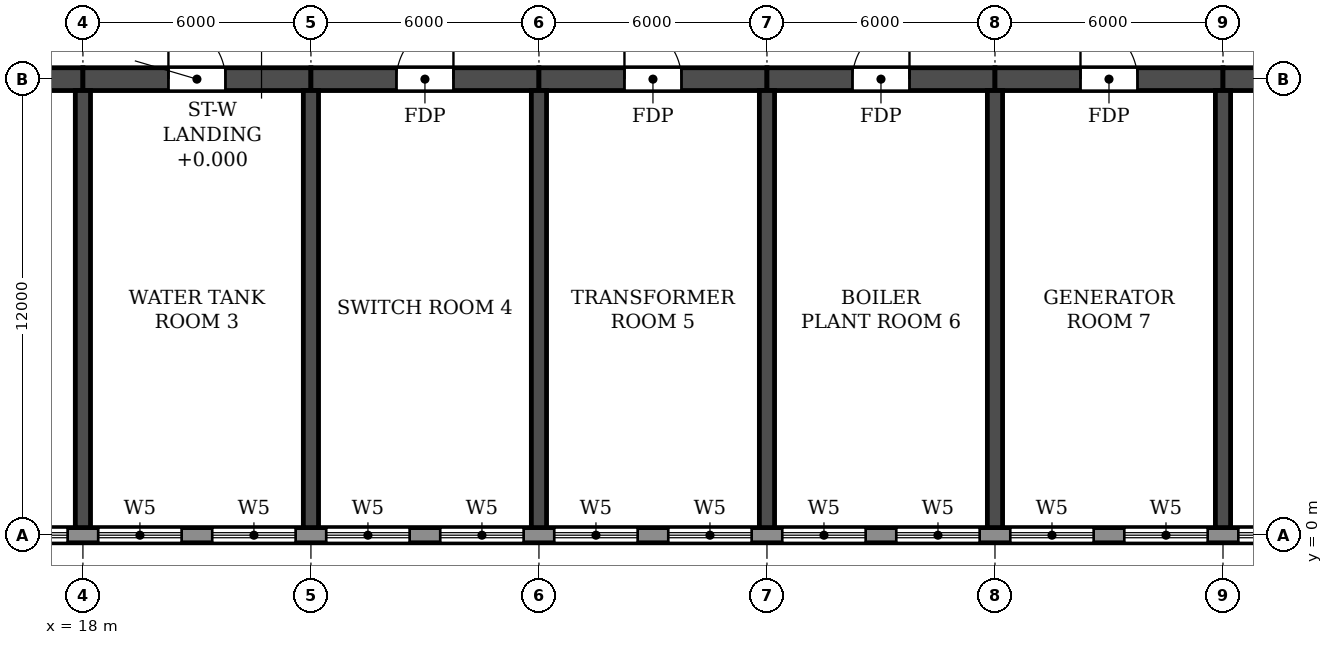
"""IFC4 building model, lengths in metres.
Left out: names, types, materials, properties, quantities, classifications, styles, units other than length and angle.
Written with IfcOpenShell. Run it as: python <this file> out.ifc"""

import sys

from ifc_helpers import new_model, si_unit, direction, frame, frame_2d, origin, place, context, subcontext, project, spatial, rectangle, extrude, element, fill, save


model = new_model("IFC4")
c1 = context("Model", 3, precision=1e-05, world=origin(), true_north=direction((0.0, 1.0)))
c2 = subcontext(c1, "Body", "Model", "MODEL_VIEW")
j1 = project(units=[si_unit("LENGTHUNIT", "METRE"), si_unit("PLANEANGLEUNIT", "RADIAN")], contexts=[c1])
p1 = place(None, origin())
s1 = spatial("IfcSite", under=j1, at=p1, CompositionType="ELEMENT")
p2 = place(p1, origin())
s2 = spatial("IfcBuilding", under=s1, at=p2, CompositionType="ELEMENT")
p3 = place(p2, frame((0.0, 0.0, 66.3)))
s3 = spatial("IfcBuildingStorey", under=s2, at=p3, CompositionType="ELEMENT", Elevation=66.3)
for number, where, z_axis, x_axis in (
    (1, (18.0, 0.2, 0.0), (0.0, 0.0, 1.0), (0.0, 1.0, 0.0)),
    (2, (24.0, 0.2, 0.0), (0.0, 0.0, 1.0), (0.0, 1.0, 0.0)),
    (3, (30.0, 0.2, 0.0), (0.0, 0.0, 1.0), (0.0, 1.0, 0.0)),
    (4, (36.0, 0.2, 0.0), (0.0, 0.0, 1.0), (0.0, 1.0, 0.0)),
    (5, (42.0, 0.2, 0.0), (0.0, 0.0, 1.0), (0.0, 1.0, 0.0)),
    (6, (48.0, 0.2, 0.0), (0.0, 0.0, 1.0), (0.0, 1.0, 0.0)),
):
    element("IfcWall", number, at=place(p3, frame(where, z_axis=z_axis, x_axis=x_axis)), inside=s3, PredefinedType="SHEAR", context=c2, shape_type="SweptSolid", body=[
        extrude(rectangle(XDim=11.5, YDim=0.4, at=frame_2d((5.75, 0.0))), origin(), (0.0, 0.0, 1.0), 6.36),
    ])
p4 = place(p3, frame((12.0, 12.0, 0.0), z_axis=(0.0, 0.0, 1.0), x_axis=(1.0, 0.0, 0.0)))
e7 = element("IfcWall", 7, at=p4, inside=s3, PredefinedType="SHEAR", context=c2, shape_type="SweptSolid", body=[
    extrude(rectangle(XDim=6.0, YDim=0.6, at=frame_2d((3.0, 0.0))), origin(), (0.0, 0.0, 1.0), 6.36),
])
p5 = place(p4, frame((2.25, 0.0, 0.0)))
e8 = element("IfcOpeningElement", 8, at=p5, cuts=e7, PredefinedType="OPENING", context=c2, shape_type="SweptSolid", body=[
    extrude(rectangle(XDim=1.5, YDim=2.1, at=frame_2d((0.75, 1.05))), frame((0.0, 0.31, 0.0), z_axis=(0.0, -1.0, 0.0), x_axis=(1.0, 0.0, 0.0)), (0.0, 0.0, 1.0), 0.62),
])
p6 = place(p3, frame((18.0, 12.0, 0.0), z_axis=(0.0, 0.0, 1.0), x_axis=(1.0, 0.0, 0.0)))
e9 = element("IfcWall", 9, at=p6, inside=s3, PredefinedType="SHEAR", context=c2, shape_type="SweptSolid", body=[
    extrude(rectangle(XDim=6.0, YDim=0.6, at=frame_2d((3.0, 0.0))), origin(), (0.0, 0.0, 1.0), 6.36),
])
p7 = place(p6, frame((2.25, 0.0, 0.0)))
e10 = element("IfcOpeningElement", 10, at=p7, cuts=e9, PredefinedType="OPENING", context=c2, shape_type="SweptSolid", body=[
    extrude(rectangle(XDim=1.5, YDim=2.1, at=frame_2d((0.75, 1.05))), frame((0.0, 0.31, 0.0), z_axis=(0.0, -1.0, 0.0), x_axis=(1.0, 0.0, 0.0)), (0.0, 0.0, 1.0), 0.62),
])
p8 = place(p3, frame((24.0, 12.0, 0.0), z_axis=(0.0, 0.0, 1.0), x_axis=(1.0, 0.0, 0.0)))
e11 = element("IfcWall", 11, at=p8, inside=s3, PredefinedType="SHEAR", context=c2, shape_type="SweptSolid", body=[
    extrude(rectangle(XDim=6.0, YDim=0.6, at=frame_2d((3.0, 0.0))), origin(), (0.0, 0.0, 1.0), 6.36),
])
p9 = place(p8, frame((2.25, 0.0, 0.0)))
e12 = element("IfcOpeningElement", 12, at=p9, cuts=e11, PredefinedType="OPENING", context=c2, shape_type="SweptSolid", body=[
    extrude(rectangle(XDim=1.5, YDim=2.1, at=frame_2d((0.75, 1.05))), frame((0.0, 0.31, 0.0), z_axis=(0.0, -1.0, 0.0), x_axis=(1.0, 0.0, 0.0)), (0.0, 0.0, 1.0), 0.62),
])
p10 = place(p3, frame((30.0, 12.0, 0.0), z_axis=(0.0, 0.0, 1.0), x_axis=(1.0, 0.0, 0.0)))
e13 = element("IfcWall", 13, at=p10, inside=s3, PredefinedType="SHEAR", context=c2, shape_type="SweptSolid", body=[
    extrude(rectangle(XDim=6.0, YDim=0.6, at=frame_2d((3.0, 0.0))), origin(), (0.0, 0.0, 1.0), 6.36),
])
p11 = place(p10, frame((2.25, 0.0, 0.0)))
e14 = element("IfcOpeningElement", 14, at=p11, cuts=e13, PredefinedType="OPENING", context=c2, shape_type="SweptSolid", body=[
    extrude(rectangle(XDim=1.5, YDim=2.1, at=frame_2d((0.75, 1.05))), frame((0.0, 0.31, 0.0), z_axis=(0.0, -1.0, 0.0), x_axis=(1.0, 0.0, 0.0)), (0.0, 0.0, 1.0), 0.62),
])
p12 = place(p3, frame((36.0, 12.0, 0.0), z_axis=(0.0, 0.0, 1.0), x_axis=(1.0, 0.0, 0.0)))
e15 = element("IfcWall", 15, at=p12, inside=s3, PredefinedType="SHEAR", context=c2, shape_type="SweptSolid", body=[
    extrude(rectangle(XDim=6.0, YDim=0.6, at=frame_2d((3.0, 0.0))), origin(), (0.0, 0.0, 1.0), 6.36),
])
p13 = place(p12, frame((2.25, 0.0, 0.0)))
e16 = element("IfcOpeningElement", 16, at=p13, cuts=e15, PredefinedType="OPENING", context=c2, shape_type="SweptSolid", body=[
    extrude(rectangle(XDim=1.5, YDim=2.1, at=frame_2d((0.75, 1.05))), frame((0.0, 0.31, 0.0), z_axis=(0.0, -1.0, 0.0), x_axis=(1.0, 0.0, 0.0)), (0.0, 0.0, 1.0), 0.62),
])
p14 = place(p3, frame((42.0, 12.0, 0.0), z_axis=(0.0, 0.0, 1.0), x_axis=(1.0, 0.0, 0.0)))
e17 = element("IfcWall", 17, at=p14, inside=s3, PredefinedType="SHEAR", context=c2, shape_type="SweptSolid", body=[
    extrude(rectangle(XDim=6.0, YDim=0.6, at=frame_2d((3.0, 0.0))), origin(), (0.0, 0.0, 1.0), 6.36),
])
p15 = place(p14, frame((2.25, 0.0, 0.0)))
e18 = element("IfcOpeningElement", 18, at=p15, cuts=e17, PredefinedType="OPENING", context=c2, shape_type="SweptSolid", body=[
    extrude(rectangle(XDim=1.5, YDim=2.1, at=frame_2d((0.75, 1.05))), frame((0.0, 0.31, 0.0), z_axis=(0.0, -1.0, 0.0), x_axis=(1.0, 0.0, 0.0)), (0.0, 0.0, 1.0), 0.62),
])
p16 = place(p3, frame((48.0, 12.0, 0.0), z_axis=(0.0, 0.0, 1.0), x_axis=(1.0, 0.0, 0.0)))
e19 = element("IfcWall", 19, at=p16, inside=s3, PredefinedType="SHEAR", context=c2, shape_type="SweptSolid", body=[
    extrude(rectangle(XDim=6.0, YDim=0.6, at=frame_2d((3.0, 0.0))), origin(), (0.0, 0.0, 1.0), 6.36),
])
p17 = place(p16, frame((2.25, 0.0, 0.0)))
e20 = element("IfcOpeningElement", 20, at=p17, cuts=e19, PredefinedType="OPENING", context=c2, shape_type="SweptSolid", body=[
    extrude(rectangle(XDim=1.5, YDim=2.1, at=frame_2d((0.75, 1.05))), frame((0.0, 0.31, 0.0), z_axis=(0.0, -1.0, 0.0), x_axis=(1.0, 0.0, 0.0)), (0.0, 0.0, 1.0), 0.62),
])
p18 = place(p3, frame((10.683, 0.0, 0.0), z_axis=(0.0, 0.0, 1.0), x_axis=(1.0, 0.0, 0.0)))
e21 = element("IfcWall", 21, at=p18, inside=s3, PredefinedType="STANDARD", context=c2, shape_type="SweptSolid", body=[
    extrude(rectangle(XDim=80.634, YDim=0.4, at=frame_2d((40.317, 0.0))), origin(), (0.0, 0.0, 1.0), 6.36),
])
p19 = place(p18, frame((1.717, 0.0, 0.6)))
e22 = element("IfcOpeningElement", 22, at=p19, cuts=e21, PredefinedType="OPENING", context=c2, shape_type="SweptSolid", body=[
    extrude(rectangle(XDim=2.2, YDim=2.4, at=frame_2d((1.1, 1.2))), frame((0.0, 0.21, 0.0), z_axis=(0.0, -1.0, 0.0), x_axis=(1.0, 0.0, 0.0)), (0.0, 0.0, 1.0), 0.42),
])
p20 = place(p18, frame((4.717, 0.0, 0.6)))
e23 = element("IfcOpeningElement", 23, at=p20, cuts=e21, PredefinedType="OPENING", context=c2, shape_type="SweptSolid", body=[
    extrude(rectangle(XDim=2.2, YDim=2.4, at=frame_2d((1.1, 1.2))), frame((0.0, 0.21, 0.0), z_axis=(0.0, -1.0, 0.0), x_axis=(1.0, 0.0, 0.0)), (0.0, 0.0, 1.0), 0.42),
])
p21 = place(p18, frame((7.717, 0.0, 0.6)))
e24 = element("IfcOpeningElement", 24, at=p21, cuts=e21, PredefinedType="OPENING", context=c2, shape_type="SweptSolid", body=[
    extrude(rectangle(XDim=2.2, YDim=2.4, at=frame_2d((1.1, 1.2))), frame((0.0, 0.21, 0.0), z_axis=(0.0, -1.0, 0.0), x_axis=(1.0, 0.0, 0.0)), (0.0, 0.0, 1.0), 0.42),
])
p22 = place(p18, frame((10.717, 0.0, 0.6)))
e25 = element("IfcOpeningElement", 25, at=p22, cuts=e21, PredefinedType="OPENING", context=c2, shape_type="SweptSolid", body=[
    extrude(rectangle(XDim=2.2, YDim=2.4, at=frame_2d((1.1, 1.2))), frame((0.0, 0.21, 0.0), z_axis=(0.0, -1.0, 0.0), x_axis=(1.0, 0.0, 0.0)), (0.0, 0.0, 1.0), 0.42),
])
p23 = place(p18, frame((13.717, 0.0, 0.6)))
e26 = element("IfcOpeningElement", 26, at=p23, cuts=e21, PredefinedType="OPENING", context=c2, shape_type="SweptSolid", body=[
    extrude(rectangle(XDim=2.2, YDim=2.4, at=frame_2d((1.1, 1.2))), frame((0.0, 0.21, 0.0), z_axis=(0.0, -1.0, 0.0), x_axis=(1.0, 0.0, 0.0)), (0.0, 0.0, 1.0), 0.42),
])
p24 = place(p18, frame((16.717, 0.0, 0.6)))
e27 = element("IfcOpeningElement", 27, at=p24, cuts=e21, PredefinedType="OPENING", context=c2, shape_type="SweptSolid", body=[
    extrude(rectangle(XDim=2.2, YDim=2.4, at=frame_2d((1.1, 1.2))), frame((0.0, 0.21, 0.0), z_axis=(0.0, -1.0, 0.0), x_axis=(1.0, 0.0, 0.0)), (0.0, 0.0, 1.0), 0.42),
])
p25 = place(p18, frame((19.717, 0.0, 0.6)))
e28 = element("IfcOpeningElement", 28, at=p25, cuts=e21, PredefinedType="OPENING", context=c2, shape_type="SweptSolid", body=[
    extrude(rectangle(XDim=2.2, YDim=2.4, at=frame_2d((1.1, 1.2))), frame((0.0, 0.21, 0.0), z_axis=(0.0, -1.0, 0.0), x_axis=(1.0, 0.0, 0.0)), (0.0, 0.0, 1.0), 0.42),
])
p26 = place(p18, frame((22.717, 0.0, 0.6)))
e29 = element("IfcOpeningElement", 29, at=p26, cuts=e21, PredefinedType="OPENING", context=c2, shape_type="SweptSolid", body=[
    extrude(rectangle(XDim=2.2, YDim=2.4, at=frame_2d((1.1, 1.2))), frame((0.0, 0.21, 0.0), z_axis=(0.0, -1.0, 0.0), x_axis=(1.0, 0.0, 0.0)), (0.0, 0.0, 1.0), 0.42),
])
p27 = place(p18, frame((25.717, 0.0, 0.6)))
e30 = element("IfcOpeningElement", 30, at=p27, cuts=e21, PredefinedType="OPENING", context=c2, shape_type="SweptSolid", body=[
    extrude(rectangle(XDim=2.2, YDim=2.4, at=frame_2d((1.1, 1.2))), frame((0.0, 0.21, 0.0), z_axis=(0.0, -1.0, 0.0), x_axis=(1.0, 0.0, 0.0)), (0.0, 0.0, 1.0), 0.42),
])
p28 = place(p18, frame((28.717, 0.0, 0.6)))
e31 = element("IfcOpeningElement", 31, at=p28, cuts=e21, PredefinedType="OPENING", context=c2, shape_type="SweptSolid", body=[
    extrude(rectangle(XDim=2.2, YDim=2.4, at=frame_2d((1.1, 1.2))), frame((0.0, 0.21, 0.0), z_axis=(0.0, -1.0, 0.0), x_axis=(1.0, 0.0, 0.0)), (0.0, 0.0, 1.0), 0.42),
])
p29 = place(p18, frame((31.717, 0.0, 0.6)))
e32 = element("IfcOpeningElement", 32, at=p29, cuts=e21, PredefinedType="OPENING", context=c2, shape_type="SweptSolid", body=[
    extrude(rectangle(XDim=2.2, YDim=2.4, at=frame_2d((1.1, 1.2))), frame((0.0, 0.21, 0.0), z_axis=(0.0, -1.0, 0.0), x_axis=(1.0, 0.0, 0.0)), (0.0, 0.0, 1.0), 0.42),
])
p30 = place(p18, frame((34.717, 0.0, 0.6)))
e33 = element("IfcOpeningElement", 33, at=p30, cuts=e21, PredefinedType="OPENING", context=c2, shape_type="SweptSolid", body=[
    extrude(rectangle(XDim=2.2, YDim=2.4, at=frame_2d((1.1, 1.2))), frame((0.0, 0.21, 0.0), z_axis=(0.0, -1.0, 0.0), x_axis=(1.0, 0.0, 0.0)), (0.0, 0.0, 1.0), 0.42),
])
p31 = place(p18, frame((37.717, 0.0, 0.6)))
e34 = element("IfcOpeningElement", 34, at=p31, cuts=e21, PredefinedType="OPENING", context=c2, shape_type="SweptSolid", body=[
    extrude(rectangle(XDim=2.2, YDim=2.4, at=frame_2d((1.1, 1.2))), frame((0.0, 0.21, 0.0), z_axis=(0.0, -1.0, 0.0), x_axis=(1.0, 0.0, 0.0)), (0.0, 0.0, 1.0), 0.42),
])
p32 = place(p18, frame((40.717, 0.0, 0.6)))
e35 = element("IfcOpeningElement", 35, at=p32, cuts=e21, PredefinedType="OPENING", context=c2, shape_type="SweptSolid", body=[
    extrude(rectangle(XDim=2.2, YDim=2.4, at=frame_2d((1.1, 1.2))), frame((0.0, 0.21, 0.0), z_axis=(0.0, -1.0, 0.0), x_axis=(1.0, 0.0, 0.0)), (0.0, 0.0, 1.0), 0.42),
])
p33 = place(p18, frame((43.717, 0.0, 0.6)))
e36 = element("IfcOpeningElement", 36, at=p33, cuts=e21, PredefinedType="OPENING", context=c2, shape_type="SweptSolid", body=[
    extrude(rectangle(XDim=2.2, YDim=2.4, at=frame_2d((1.1, 1.2))), frame((0.0, 0.21, 0.0), z_axis=(0.0, -1.0, 0.0), x_axis=(1.0, 0.0, 0.0)), (0.0, 0.0, 1.0), 0.42),
])
p34 = place(p18, frame((46.717, 0.0, 0.6)))
e37 = element("IfcOpeningElement", 37, at=p34, cuts=e21, PredefinedType="OPENING", context=c2, shape_type="SweptSolid", body=[
    extrude(rectangle(XDim=2.2, YDim=2.4, at=frame_2d((1.1, 1.2))), frame((0.0, 0.21, 0.0), z_axis=(0.0, -1.0, 0.0), x_axis=(1.0, 0.0, 0.0)), (0.0, 0.0, 1.0), 0.42),
])
p35 = place(p18, frame((49.717, 0.0, 0.6)))
e38 = element("IfcOpeningElement", 38, at=p35, cuts=e21, PredefinedType="OPENING", context=c2, shape_type="SweptSolid", body=[
    extrude(rectangle(XDim=2.2, YDim=2.4, at=frame_2d((1.1, 1.2))), frame((0.0, 0.21, 0.0), z_axis=(0.0, -1.0, 0.0), x_axis=(1.0, 0.0, 0.0)), (0.0, 0.0, 1.0), 0.42),
])
p36 = place(p18, frame((52.717, 0.0, 0.6)))
e39 = element("IfcOpeningElement", 39, at=p36, cuts=e21, PredefinedType="OPENING", context=c2, shape_type="SweptSolid", body=[
    extrude(rectangle(XDim=2.2, YDim=2.4, at=frame_2d((1.1, 1.2))), frame((0.0, 0.21, 0.0), z_axis=(0.0, -1.0, 0.0), x_axis=(1.0, 0.0, 0.0)), (0.0, 0.0, 1.0), 0.42),
])
p37 = place(p18, frame((55.717, 0.0, 0.6)))
e40 = element("IfcOpeningElement", 40, at=p37, cuts=e21, PredefinedType="OPENING", context=c2, shape_type="SweptSolid", body=[
    extrude(rectangle(XDim=2.2, YDim=2.4, at=frame_2d((1.1, 1.2))), frame((0.0, 0.21, 0.0), z_axis=(0.0, -1.0, 0.0), x_axis=(1.0, 0.0, 0.0)), (0.0, 0.0, 1.0), 0.42),
])
p38 = place(p18, frame((58.717, 0.0, 0.6)))
e41 = element("IfcOpeningElement", 41, at=p38, cuts=e21, PredefinedType="OPENING", context=c2, shape_type="SweptSolid", body=[
    extrude(rectangle(XDim=2.2, YDim=2.4, at=frame_2d((1.1, 1.2))), frame((0.0, 0.21, 0.0), z_axis=(0.0, -1.0, 0.0), x_axis=(1.0, 0.0, 0.0)), (0.0, 0.0, 1.0), 0.42),
])
p39 = place(p18, frame((61.717, 0.0, 0.6)))
e42 = element("IfcOpeningElement", 42, at=p39, cuts=e21, PredefinedType="OPENING", context=c2, shape_type="SweptSolid", body=[
    extrude(rectangle(XDim=2.2, YDim=2.4, at=frame_2d((1.1, 1.2))), frame((0.0, 0.21, 0.0), z_axis=(0.0, -1.0, 0.0), x_axis=(1.0, 0.0, 0.0)), (0.0, 0.0, 1.0), 0.42),
])
p40 = place(p18, frame((64.717, 0.0, 0.6)))
e43 = element("IfcOpeningElement", 43, at=p40, cuts=e21, PredefinedType="OPENING", context=c2, shape_type="SweptSolid", body=[
    extrude(rectangle(XDim=2.2, YDim=2.4, at=frame_2d((1.1, 1.2))), frame((0.0, 0.21, 0.0), z_axis=(0.0, -1.0, 0.0), x_axis=(1.0, 0.0, 0.0)), (0.0, 0.0, 1.0), 0.42),
])
p41 = place(p18, frame((67.717, 0.0, 0.6)))
e44 = element("IfcOpeningElement", 44, at=p41, cuts=e21, PredefinedType="OPENING", context=c2, shape_type="SweptSolid", body=[
    extrude(rectangle(XDim=2.2, YDim=2.4, at=frame_2d((1.1, 1.2))), frame((0.0, 0.21, 0.0), z_axis=(0.0, -1.0, 0.0), x_axis=(1.0, 0.0, 0.0)), (0.0, 0.0, 1.0), 0.42),
])
p42 = place(p18, frame((70.717, 0.0, 0.6)))
e45 = element("IfcOpeningElement", 45, at=p42, cuts=e21, PredefinedType="OPENING", context=c2, shape_type="SweptSolid", body=[
    extrude(rectangle(XDim=2.2, YDim=2.4, at=frame_2d((1.1, 1.2))), frame((0.0, 0.21, 0.0), z_axis=(0.0, -1.0, 0.0), x_axis=(1.0, 0.0, 0.0)), (0.0, 0.0, 1.0), 0.42),
])
p43 = place(p18, frame((73.717, 0.0, 0.6)))
e46 = element("IfcOpeningElement", 46, at=p43, cuts=e21, PredefinedType="OPENING", context=c2, shape_type="SweptSolid", body=[
    extrude(rectangle(XDim=2.2, YDim=2.4, at=frame_2d((1.1, 1.2))), frame((0.0, 0.21, 0.0), z_axis=(0.0, -1.0, 0.0), x_axis=(1.0, 0.0, 0.0)), (0.0, 0.0, 1.0), 0.42),
])
p44 = place(p18, frame((76.717, 0.0, 0.6)))
e47 = element("IfcOpeningElement", 47, at=p44, cuts=e21, PredefinedType="OPENING", context=c2, shape_type="SweptSolid", body=[
    extrude(rectangle(XDim=2.2, YDim=2.4, at=frame_2d((1.1, 1.2))), frame((0.0, 0.21, 0.0), z_axis=(0.0, -1.0, 0.0), x_axis=(1.0, 0.0, 0.0)), (0.0, 0.0, 1.0), 0.42),
])
p45 = place(p20, origin())
e48 = element("IfcWindow", 48, at=p45, inside=s3, PartitioningType="TRIPLE_PANEL_HORIZONTAL", PredefinedType="WINDOW", context=c2, shape_type="SweptSolid", body=[
    extrude(rectangle(XDim=2.2, YDim=2.4, at=frame_2d((1.1, 1.2))), frame((0.0, 0.03, 0.0), z_axis=(0.0, -1.0, 0.0), x_axis=(1.0, 0.0, 0.0)), (0.0, 0.0, 1.0), 0.06),
])
fill(e23, e48)
p46 = place(p21, origin())
e49 = element("IfcWindow", 49, at=p46, inside=s3, PartitioningType="TRIPLE_PANEL_HORIZONTAL", PredefinedType="WINDOW", context=c2, shape_type="SweptSolid", body=[
    extrude(rectangle(XDim=2.2, YDim=2.4, at=frame_2d((1.1, 1.2))), frame((0.0, 0.03, 0.0), z_axis=(0.0, -1.0, 0.0), x_axis=(1.0, 0.0, 0.0)), (0.0, 0.0, 1.0), 0.06),
])
fill(e24, e49)
p47 = place(p22, origin())
e50 = element("IfcWindow", 50, at=p47, inside=s3, PartitioningType="TRIPLE_PANEL_HORIZONTAL", PredefinedType="WINDOW", context=c2, shape_type="SweptSolid", body=[
    extrude(rectangle(XDim=2.2, YDim=2.4, at=frame_2d((1.1, 1.2))), frame((0.0, 0.03, 0.0), z_axis=(0.0, -1.0, 0.0), x_axis=(1.0, 0.0, 0.0)), (0.0, 0.0, 1.0), 0.06),
])
fill(e25, e50)
p48 = place(p23, origin())
e51 = element("IfcWindow", 51, at=p48, inside=s3, PartitioningType="TRIPLE_PANEL_HORIZONTAL", PredefinedType="WINDOW", context=c2, shape_type="SweptSolid", body=[
    extrude(rectangle(XDim=2.2, YDim=2.4, at=frame_2d((1.1, 1.2))), frame((0.0, 0.03, 0.0), z_axis=(0.0, -1.0, 0.0), x_axis=(1.0, 0.0, 0.0)), (0.0, 0.0, 1.0), 0.06),
])
fill(e26, e51)
p49 = place(p24, origin())
e52 = element("IfcWindow", 52, at=p49, inside=s3, PartitioningType="TRIPLE_PANEL_HORIZONTAL", PredefinedType="WINDOW", context=c2, shape_type="SweptSolid", body=[
    extrude(rectangle(XDim=2.2, YDim=2.4, at=frame_2d((1.1, 1.2))), frame((0.0, 0.03, 0.0), z_axis=(0.0, -1.0, 0.0), x_axis=(1.0, 0.0, 0.0)), (0.0, 0.0, 1.0), 0.06),
])
fill(e27, e52)
p50 = place(p25, origin())
e53 = element("IfcWindow", 53, at=p50, inside=s3, PartitioningType="TRIPLE_PANEL_HORIZONTAL", PredefinedType="WINDOW", context=c2, shape_type="SweptSolid", body=[
    extrude(rectangle(XDim=2.2, YDim=2.4, at=frame_2d((1.1, 1.2))), frame((0.0, 0.03, 0.0), z_axis=(0.0, -1.0, 0.0), x_axis=(1.0, 0.0, 0.0)), (0.0, 0.0, 1.0), 0.06),
])
fill(e28, e53)
p51 = place(p26, origin())
e54 = element("IfcWindow", 54, at=p51, inside=s3, PartitioningType="TRIPLE_PANEL_HORIZONTAL", PredefinedType="WINDOW", context=c2, shape_type="SweptSolid", body=[
    extrude(rectangle(XDim=2.2, YDim=2.4, at=frame_2d((1.1, 1.2))), frame((0.0, 0.03, 0.0), z_axis=(0.0, -1.0, 0.0), x_axis=(1.0, 0.0, 0.0)), (0.0, 0.0, 1.0), 0.06),
])
fill(e29, e54)
p52 = place(p27, origin())
e55 = element("IfcWindow", 55, at=p52, inside=s3, PartitioningType="TRIPLE_PANEL_HORIZONTAL", PredefinedType="WINDOW", context=c2, shape_type="SweptSolid", body=[
    extrude(rectangle(XDim=2.2, YDim=2.4, at=frame_2d((1.1, 1.2))), frame((0.0, 0.03, 0.0), z_axis=(0.0, -1.0, 0.0), x_axis=(1.0, 0.0, 0.0)), (0.0, 0.0, 1.0), 0.06),
])
fill(e30, e55)
p53 = place(p28, origin())
e56 = element("IfcWindow", 56, at=p53, inside=s3, PartitioningType="TRIPLE_PANEL_HORIZONTAL", PredefinedType="WINDOW", context=c2, shape_type="SweptSolid", body=[
    extrude(rectangle(XDim=2.2, YDim=2.4, at=frame_2d((1.1, 1.2))), frame((0.0, 0.03, 0.0), z_axis=(0.0, -1.0, 0.0), x_axis=(1.0, 0.0, 0.0)), (0.0, 0.0, 1.0), 0.06),
])
fill(e31, e56)
p54 = place(p29, origin())
e57 = element("IfcWindow", 57, at=p54, inside=s3, PartitioningType="TRIPLE_PANEL_HORIZONTAL", PredefinedType="WINDOW", context=c2, shape_type="SweptSolid", body=[
    extrude(rectangle(XDim=2.2, YDim=2.4, at=frame_2d((1.1, 1.2))), frame((0.0, 0.03, 0.0), z_axis=(0.0, -1.0, 0.0), x_axis=(1.0, 0.0, 0.0)), (0.0, 0.0, 1.0), 0.06),
])
fill(e32, e57)
p55 = place(p30, origin())
e58 = element("IfcWindow", 58, at=p55, inside=s3, PartitioningType="TRIPLE_PANEL_HORIZONTAL", PredefinedType="WINDOW", context=c2, shape_type="SweptSolid", body=[
    extrude(rectangle(XDim=2.2, YDim=2.4, at=frame_2d((1.1, 1.2))), frame((0.0, 0.03, 0.0), z_axis=(0.0, -1.0, 0.0), x_axis=(1.0, 0.0, 0.0)), (0.0, 0.0, 1.0), 0.06),
])
fill(e33, e58)
p56 = place(p31, origin())
e59 = element("IfcWindow", 59, at=p56, inside=s3, PartitioningType="TRIPLE_PANEL_HORIZONTAL", PredefinedType="WINDOW", context=c2, shape_type="SweptSolid", body=[
    extrude(rectangle(XDim=2.2, YDim=2.4, at=frame_2d((1.1, 1.2))), frame((0.0, 0.03, 0.0), z_axis=(0.0, -1.0, 0.0), x_axis=(1.0, 0.0, 0.0)), (0.0, 0.0, 1.0), 0.06),
])
fill(e34, e59)
p57 = place(p7, origin())
e60 = element("IfcDoor", 60, at=p57, inside=s3, OperationType="DOUBLE_DOOR_SINGLE_SWING", PredefinedType="DOOR", context=c2, shape_type="SweptSolid", body=[
    extrude(rectangle(XDim=1.5, YDim=2.1, at=frame_2d((0.75, 1.05))), frame((0.0, 0.025, 0.0), z_axis=(0.0, -1.0, 0.0), x_axis=(1.0, 0.0, 0.0)), (0.0, 0.0, 1.0), 0.05),
])
fill(e10, e60)
p58 = place(p9, origin())
e61 = element("IfcDoor", 61, at=p58, inside=s3, OperationType="DOUBLE_DOOR_SINGLE_SWING", PredefinedType="DOOR", context=c2, shape_type="SweptSolid", body=[
    extrude(rectangle(XDim=1.5, YDim=2.1, at=frame_2d((0.75, 1.05))), frame((0.0, 0.025, 0.0), z_axis=(0.0, -1.0, 0.0), x_axis=(1.0, 0.0, 0.0)), (0.0, 0.0, 1.0), 0.05),
])
fill(e12, e61)
p59 = place(p11, origin())
e62 = element("IfcDoor", 62, at=p59, inside=s3, OperationType="DOUBLE_DOOR_SINGLE_SWING", PredefinedType="DOOR", context=c2, shape_type="SweptSolid", body=[
    extrude(rectangle(XDim=1.5, YDim=2.1, at=frame_2d((0.75, 1.05))), frame((0.0, 0.025, 0.0), z_axis=(0.0, -1.0, 0.0), x_axis=(1.0, 0.0, 0.0)), (0.0, 0.0, 1.0), 0.05),
])
fill(e14, e62)
p60 = place(p13, origin())
e63 = element("IfcDoor", 63, at=p60, inside=s3, OperationType="DOUBLE_DOOR_SINGLE_SWING", PredefinedType="DOOR", context=c2, shape_type="SweptSolid", body=[
    extrude(rectangle(XDim=1.5, YDim=2.1, at=frame_2d((0.75, 1.05))), frame((0.0, 0.025, 0.0), z_axis=(0.0, -1.0, 0.0), x_axis=(1.0, 0.0, 0.0)), (0.0, 0.0, 1.0), 0.05),
])
fill(e16, e63)
p61 = place(p15, origin())
e64 = element("IfcDoor", 64, at=p61, inside=s3, OperationType="DOUBLE_DOOR_SINGLE_SWING", PredefinedType="DOOR", context=c2, shape_type="SweptSolid", body=[
    extrude(rectangle(XDim=1.5, YDim=2.1, at=frame_2d((0.75, 1.05))), frame((0.0, 0.025, 0.0), z_axis=(0.0, -1.0, 0.0), x_axis=(1.0, 0.0, 0.0)), (0.0, 0.0, 1.0), 0.05),
])
fill(e18, e64)
save(model, sys.argv[1])
